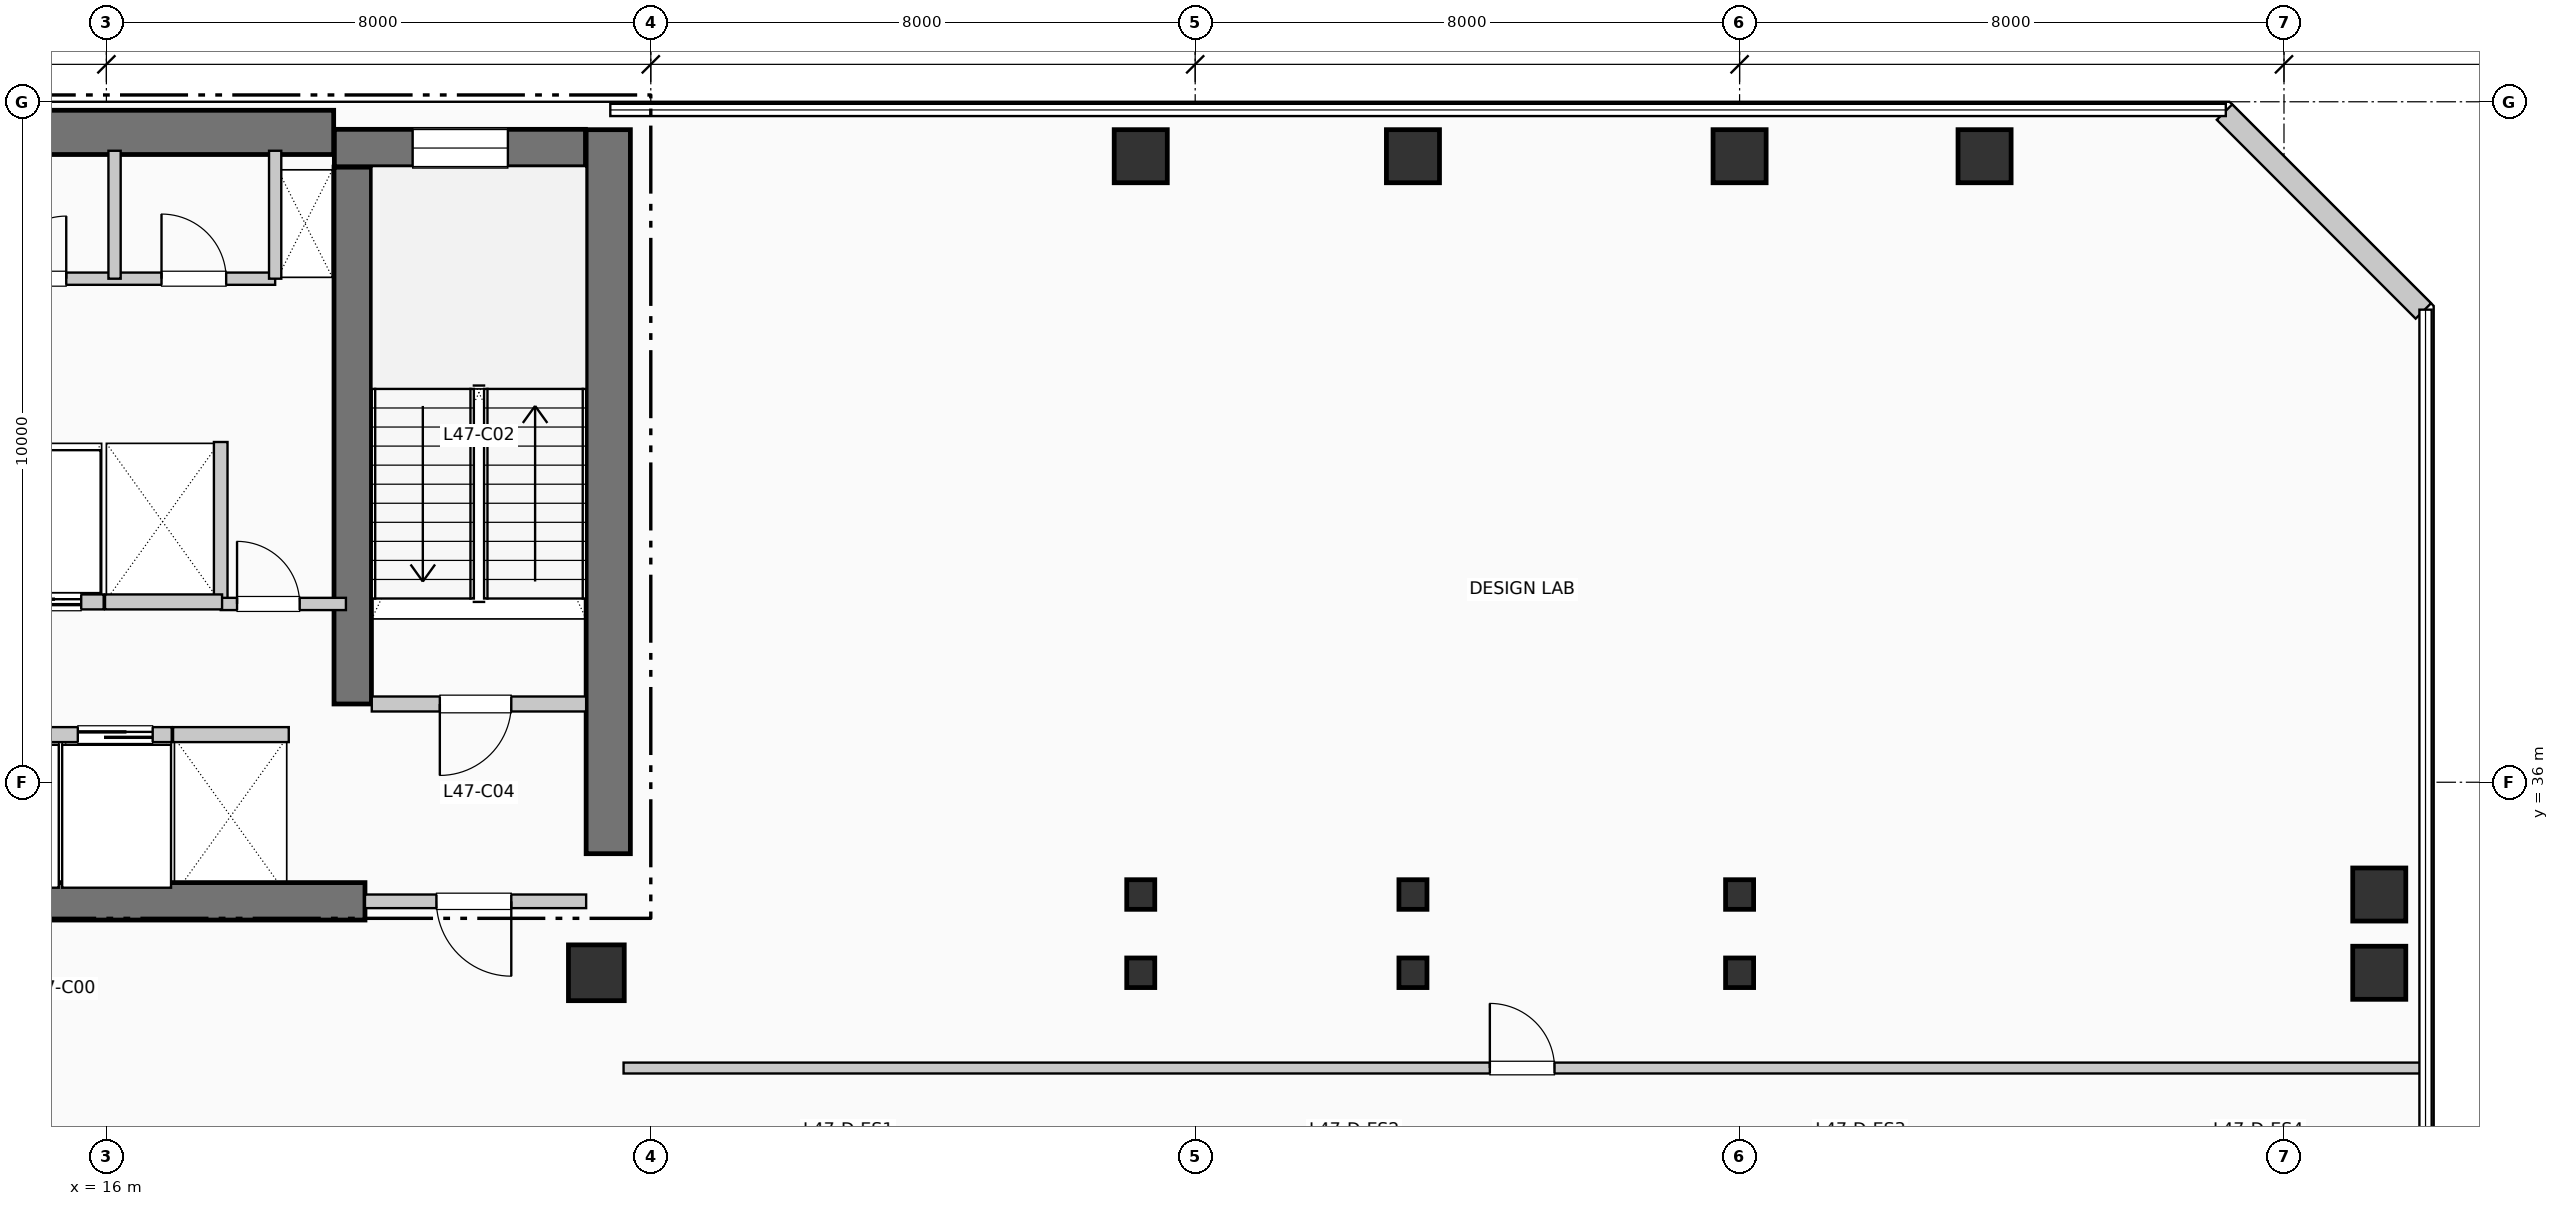
"""IFC4 building model, lengths in metres.
Left out: names, types, materials, properties, quantities, classifications, styles, units other than length and angle.
Written with IfcOpenShell. Run it as: python <this file> out.ifc"""

import sys

from ifc_helpers import new_model, si_unit, direction, frame, frame_2d, origin, origin_2d, place, context, subcontext, project, spatial, rectangle, i_section, extrude, element, fill, save


model = new_model("IFC4")
c1 = context("Model", 3, precision=1e-05, world=origin(), true_north=direction((0.0, 1.0)))
c2 = subcontext(c1, "Body", "Model", "MODEL_VIEW")
j1 = project(units=[si_unit("LENGTHUNIT", "METRE"), si_unit("PLANEANGLEUNIT", "RADIAN")], contexts=[c1])
p1 = place(None, origin())
s1 = spatial("IfcSite", under=j1, at=p1, CompositionType="ELEMENT")
p2 = place(p1, origin())
s2 = spatial("IfcBuilding", under=s1, at=p2, CompositionType="ELEMENT")
p3 = place(p2, frame((0.0, 0.0, 195.36)))
s3 = spatial("IfcBuildingStorey", under=s2, at=p3, CompositionType="ELEMENT", Elevation=195.36)
p4 = place(p3, frame((5.36, 45.55, 0.0), z_axis=(0.0, 0.0, 1.0), x_axis=(1.0, 0.0, 0.0)))
e1 = element("IfcWall", 1, at=p4, inside=s3, PredefinedType="SHEAR", context=c2, shape_type="SweptSolid", body=[
    extrude(rectangle(XDim=13.98, YDim=0.65, at=frame_2d((6.99, 0.0))), origin(), (0.0, 0.0, 1.0), 3.96),
])
p5 = place(p3, frame((23.375, 34.95, 0.0), z_axis=(0.0, 0.0, 1.0), x_axis=(0.0, 1.0, 0.0)))
e2 = element("IfcWall", 2, at=p5, inside=s3, PredefinedType="SHEAR", context=c2, shape_type="SweptSolid", body=[
    extrude(rectangle(XDim=10.64, YDim=0.65, at=frame_2d((5.32, 0.0))), origin(), (0.0, 0.0, 1.0), 3.96),
])
p6 = place(p3, frame((13.68, 34.25, 0.0), z_axis=(0.0, 0.0, 1.0), x_axis=(1.0, 0.0, 0.0)))
e3 = element("IfcWall", 3, at=p6, inside=s3, PredefinedType="SHEAR", context=c2, shape_type="SweptSolid", body=[
    extrude(rectangle(XDim=6.12, YDim=0.55, at=frame_2d((3.06, 0.0))), origin(), (0.0, 0.0, 1.0), 3.96),
])
p7 = place(p3, frame((19.62, 37.15, 0.0), z_axis=(0.0, 0.0, 1.0), x_axis=(0.0, 1.0, 0.0)))
e4 = element("IfcWall", 4, at=p7, inside=s3, PredefinedType="SHEAR", context=c2, shape_type="SweptSolid", body=[
    extrude(rectangle(XDim=7.89, YDim=0.55, at=frame_2d((3.945, 0.0))), origin(), (0.0, 0.0, 1.0), 3.96),
])
p8 = place(p3, frame((19.35, 45.32, 0.0), z_axis=(0.0, 0.0, 1.0), x_axis=(1.0, 0.0, 0.0)))
e5 = element("IfcWall", 5, at=p8, inside=s3, PredefinedType="SHEAR", context=c2, shape_type="SweptSolid", body=[
    extrude(rectangle(XDim=3.69, YDim=0.55, at=frame_2d((1.845, 0.0))), origin(), (0.0, 0.0, 1.0), 3.96),
])
p9 = place(p8, frame((1.15, 0.0, 1.05)))
e6 = element("IfcOpeningElement", 6, at=p9, cuts=e5, PredefinedType="OPENING", context=c2, shape_type="SweptSolid", body=[
    extrude(rectangle(XDim=1.4, YDim=1.8, at=frame_2d((0.7, 0.9))), frame((0.0, 0.285, 0.0), z_axis=(0.0, -1.0, 0.0), x_axis=(1.0, 0.0, 0.0)), (0.0, 0.0, 1.0), 0.57),
])
p10 = place(p3, frame((23.2, 33.2, 0.0), z_axis=(0.0, 0.0, 1.0), x_axis=(1.0, 0.0, 0.0)))
e7 = element("IfcColumn", 7, at=p10, inside=s3, PredefinedType="COLUMN", context=c2, shape_type="SweptSolid", body=[
    extrude(rectangle(XDim=0.82, YDim=0.82, at=origin_2d()), origin(), (0.0, 0.0, 1.0), 3.96),
])
for number, where, z_axis, x_axis in (
    (8, (31.2, 33.2, 0.0), (0.0, 0.0, 1.0), (1.0, 0.0, 0.0)),
    (9, (31.2, 34.35, 0.0), (0.0, 0.0, 1.0), (1.0, 0.0, 0.0)),
):
    element("IfcColumn", number, at=place(p3, frame(where, z_axis=z_axis, x_axis=x_axis)), inside=s3, PredefinedType="COLUMN", context=c2, shape_type="SweptSolid", body=[
        extrude(i_section(OverallWidth=0.412, OverallDepth=0.435, WebThickness=0.027, FlangeThickness=0.043, at=origin_2d()), origin(), (0.0, 0.0, 1.0), 3.96),
    ])
p11 = place(p3, frame((31.2, 45.2, 0.0), z_axis=(0.0, 0.0, 1.0), x_axis=(1.0, 0.0, 0.0)))
e10 = element("IfcColumn", 10, at=p11, inside=s3, PredefinedType="COLUMN", context=c2, shape_type="SweptSolid", body=[
    extrude(rectangle(XDim=0.78, YDim=0.78, at=origin_2d()), origin(), (0.0, 0.0, 1.0), 3.96),
])
for number, where, z_axis, x_axis in (
    (11, (35.2, 33.2, 0.0), (0.0, 0.0, 1.0), (1.0, 0.0, 0.0)),
    (12, (35.2, 34.35, 0.0), (0.0, 0.0, 1.0), (1.0, 0.0, 0.0)),
):
    element("IfcColumn", number, at=place(p3, frame(where, z_axis=z_axis, x_axis=x_axis)), inside=s3, PredefinedType="COLUMN", context=c2, shape_type="SweptSolid", body=[
        extrude(i_section(OverallWidth=0.412, OverallDepth=0.435, WebThickness=0.027, FlangeThickness=0.043, at=origin_2d()), origin(), (0.0, 0.0, 1.0), 3.96),
    ])
p12 = place(p3, frame((35.2, 45.2, 0.0), z_axis=(0.0, 0.0, 1.0), x_axis=(1.0, 0.0, 0.0)))
e13 = element("IfcColumn", 13, at=p12, inside=s3, PredefinedType="COLUMN", context=c2, shape_type="SweptSolid", body=[
    extrude(rectangle(XDim=0.78, YDim=0.78, at=origin_2d()), origin(), (0.0, 0.0, 1.0), 3.96),
])
for number, where, z_axis, x_axis in (
    (14, (40.0, 33.2, 0.0), (0.0, 0.0, 1.0), (1.0, 0.0, 0.0)),
    (15, (40.0, 34.35, 0.0), (0.0, 0.0, 1.0), (1.0, 0.0, 0.0)),
):
    element("IfcColumn", number, at=place(p3, frame(where, z_axis=z_axis, x_axis=x_axis)), inside=s3, PredefinedType="COLUMN", context=c2, shape_type="SweptSolid", body=[
        extrude(i_section(OverallWidth=0.412, OverallDepth=0.435, WebThickness=0.027, FlangeThickness=0.043, at=origin_2d()), origin(), (0.0, 0.0, 1.0), 3.96),
    ])
for number, where, z_axis, x_axis in (
    (16, (40.0, 45.2, 0.0), (0.0, 0.0, 1.0), (1.0, 0.0, 0.0)),
    (17, (43.6, 45.2, 0.0), (0.0, 0.0, 1.0), (1.0, 0.0, 0.0)),
    (18, (49.4, 33.2, 0.0), (0.0, 0.0, 1.0), (1.0, 0.0, 0.0)),
    (19, (49.4, 34.35, 0.0), (0.0, 0.0, 1.0), (1.0, 0.0, 0.0)),
):
    element("IfcColumn", number, at=place(p3, frame(where, z_axis=z_axis, x_axis=x_axis)), inside=s3, PredefinedType="COLUMN", context=c2, shape_type="SweptSolid", body=[
        extrude(rectangle(XDim=0.78, YDim=0.78, at=origin_2d()), origin(), (0.0, 0.0, 1.0), 3.96),
    ])
p13 = place(p3, frame((50.048, 42.926, 0.0), z_axis=(0.0, 0.0, 1.0), x_axis=(-0.707136318428, 0.707077242712, 0.0)))
e20 = element("IfcWall", 20, at=p13, inside=s3, PredefinedType="SOLIDWALL", context=c2, shape_type="SweptSolid", body=[
    extrude(rectangle(XDim=4.133, YDim=0.32, at=frame_2d((2.066, 0.0))), origin(), (0.0, 0.0, 1.0), 3.71),
])
p14 = place(p3, frame((19.9, 37.15, 0.0), z_axis=(0.0, 0.0, 1.0), x_axis=(1.0, 0.0, 0.0)))
e21 = element("IfcWall", 21, at=p14, inside=s3, PredefinedType="PARTITIONING", context=c2, shape_type="SweptSolid", body=[
    extrude(rectangle(XDim=3.15, YDim=0.22, at=frame_2d((1.575, 0.0))), origin(), (0.0, 0.0, 1.0), 3.71),
])
p15 = place(p14, frame((2.05, 0.0, 0.0), z_axis=(0.0, 0.0, 1.0), x_axis=(-1.0, 0.0, 0.0)))
e22 = element("IfcOpeningElement", 22, at=p15, cuts=e21, PredefinedType="OPENING", context=c2, shape_type="SweptSolid", body=[
    extrude(rectangle(XDim=1.05, YDim=2.15, at=frame_2d((0.525, 1.075))), frame((0.0, 0.12, 0.0), z_axis=(0.0, -1.0, 0.0), x_axis=(1.0, 0.0, 0.0)), (0.0, 0.0, 1.0), 0.24),
])
p16 = place(p3, frame((19.8, 34.25, 0.0), z_axis=(0.0, 0.0, 1.0), x_axis=(1.0, 0.0, 0.0)))
e23 = element("IfcWall", 23, at=p16, inside=s3, PredefinedType="PARTITIONING", context=c2, shape_type="SweptSolid", body=[
    extrude(rectangle(XDim=3.25, YDim=0.2, at=frame_2d((1.625, 0.0))), origin(), (0.0, 0.0, 1.0), 3.71),
])
p17 = place(p16, frame((2.15, 0.0, 0.0), z_axis=(0.0, 0.0, 1.0), x_axis=(-1.0, 0.0, 0.0)))
e24 = element("IfcOpeningElement", 24, at=p17, cuts=e23, PredefinedType="OPENING", context=c2, shape_type="SweptSolid", body=[
    extrude(rectangle(XDim=1.1, YDim=2.15, at=frame_2d((0.55, 1.075))), frame((0.0, 0.11, 0.0), z_axis=(0.0, -1.0, 0.0), x_axis=(1.0, 0.0, 0.0)), (0.0, 0.0, 1.0), 0.22),
])
p18 = place(p3, frame((17.68, 38.65, 0.0), z_axis=(0.0, 0.0, 1.0), x_axis=(0.0, 1.0, 0.0)))
e25 = element("IfcWall", 25, at=p18, inside=s3, PredefinedType="PARTITIONING", context=c2, shape_type="SweptSolid", body=[
    extrude(rectangle(XDim=2.35, YDim=0.2, at=frame_2d((1.175, 0.0))), origin(), (0.0, 0.0, 1.0), 3.71),
])
p19 = place(p3, frame((17.68, 38.62, 0.0), z_axis=(0.0, 0.0, 1.0), x_axis=(1.0, 0.0, 0.0)))
e26 = element("IfcWall", 26, at=p19, inside=s3, PredefinedType="PARTITIONING", context=c2, shape_type="SweptSolid", body=[
    extrude(rectangle(XDim=1.84, YDim=0.18, at=frame_2d((0.92, 0.0))), origin(), (0.0, 0.0, 1.0), 3.71),
])
p20 = place(p19, frame((0.24, 0.0, 0.0)))
e27 = element("IfcOpeningElement", 27, at=p20, cuts=e26, PredefinedType="OPENING", context=c2, shape_type="SweptSolid", body=[
    extrude(rectangle(XDim=0.92, YDim=2.1, at=frame_2d((0.46, 1.05))), frame((0.0, 0.1, 0.0), z_axis=(0.0, -1.0, 0.0), x_axis=(1.0, 0.0, 0.0)), (0.0, 0.0, 1.0), 0.2),
])
p21 = place(p3, frame((13.68, 36.7, 0.0), z_axis=(0.0, 0.0, 1.0), x_axis=(1.0, 0.0, 0.0)))
e28 = element("IfcWall", 28, at=p21, inside=s3, PredefinedType="PARTITIONING", context=c2, shape_type="SweptSolid", body=[
    extrude(rectangle(XDim=3.28, YDim=0.22, at=frame_2d((1.64, 0.0))), origin(), (0.0, 0.0, 1.0), 3.71),
])
p22 = place(p21, frame((0.28, 0.0, 0.0)))
e29 = element("IfcOpeningElement", 29, at=p22, cuts=e28, PredefinedType="OPENING", context=c2, shape_type="SweptSolid", body=[
    extrude(rectangle(XDim=1.1, YDim=2.2, at=frame_2d((0.55, 1.1))), frame((0.0, 0.12, 0.0), z_axis=(0.0, -1.0, 0.0), x_axis=(1.0, 0.0, 0.0)), (0.0, 0.0, 1.0), 0.24),
])
p23 = place(p21, frame((1.9, 0.0, 0.0)))
e30 = element("IfcOpeningElement", 30, at=p23, cuts=e28, PredefinedType="OPENING", context=c2, shape_type="SweptSolid", body=[
    extrude(rectangle(XDim=1.1, YDim=2.2, at=frame_2d((0.55, 1.1))), frame((0.0, 0.12, 0.0), z_axis=(0.0, -1.0, 0.0), x_axis=(1.0, 0.0, 0.0)), (0.0, 0.0, 1.0), 0.24),
])
p24 = place(p3, frame((12.58, 38.65, 0.0), z_axis=(0.0, 0.0, 1.0), x_axis=(1.0, 0.0, 0.0)))
e31 = element("IfcWall", 31, at=p24, inside=s3, PredefinedType="PARTITIONING", context=c2, shape_type="SweptSolid", body=[
    extrude(rectangle(XDim=3.38, YDim=0.22, at=frame_2d((1.69, 0.0))), origin(), (0.0, 0.0, 1.0), 3.71),
])
p25 = place(p24, frame((0.3, 0.0, 0.0)))
e32 = element("IfcOpeningElement", 32, at=p25, cuts=e31, PredefinedType="OPENING", context=c2, shape_type="SweptSolid", body=[
    extrude(rectangle(XDim=1.1, YDim=2.2, at=frame_2d((0.55, 1.1))), frame((0.0, 0.12, 0.0), z_axis=(0.0, -1.0, 0.0), x_axis=(1.0, 0.0, 0.0)), (0.0, 0.0, 1.0), 0.24),
])
p26 = place(p24, frame((1.95, 0.0, 0.0)))
e33 = element("IfcOpeningElement", 33, at=p26, cuts=e31, PredefinedType="OPENING", context=c2, shape_type="SweptSolid", body=[
    extrude(rectangle(XDim=1.1, YDim=2.2, at=frame_2d((0.55, 1.1))), frame((0.0, 0.12, 0.0), z_axis=(0.0, -1.0, 0.0), x_axis=(1.0, 0.0, 0.0)), (0.0, 0.0, 1.0), 0.24),
])
p27 = place(p3, frame((16.98, 36.7, 0.0), z_axis=(0.0, 0.0, 1.0), x_axis=(1.0, 0.0, 0.0)))
e34 = element("IfcWall", 34, at=p27, inside=s3, PredefinedType="PARTITIONING", context=c2, shape_type="SweptSolid", body=[
    extrude(rectangle(XDim=1.7, YDim=0.22, at=frame_2d((0.85, 0.0))), origin(), (0.0, 0.0, 1.0), 3.71),
])
p28 = place(p3, frame((15.98, 38.65, 0.0), z_axis=(0.0, 0.0, 1.0), x_axis=(1.0, 0.0, 0.0)))
e35 = element("IfcWall", 35, at=p28, inside=s3, PredefinedType="PARTITIONING", context=c2, shape_type="SweptSolid", body=[
    extrude(rectangle(XDim=1.72, YDim=0.22, at=frame_2d((0.86, 0.0))), origin(), (0.0, 0.0, 1.0), 3.71),
])
p29 = place(p3, frame((9.15, 43.4, 0.0), z_axis=(0.0, 0.0, 1.0), x_axis=(1.0, 0.0, 0.0)))
e36 = element("IfcWall", 36, at=p29, inside=s3, PredefinedType="PLUMBINGWALL", context=c2, shape_type="SweptSolid", body=[
    extrude(rectangle(XDim=9.33, YDim=0.18, at=frame_2d((4.665, 0.0))), origin(), (0.0, 0.0, 1.0), 3.71),
])
p30 = place(p29, frame((0.72, 0.0, 0.0)))
e37 = element("IfcOpeningElement", 37, at=p30, cuts=e36, PredefinedType="OPENING", context=c2, shape_type="SweptSolid", body=[
    extrude(rectangle(XDim=0.92, YDim=2.1, at=frame_2d((0.46, 1.05))), frame((0.0, 0.1, 0.0), z_axis=(0.0, -1.0, 0.0), x_axis=(1.0, 0.0, 0.0)), (0.0, 0.0, 1.0), 0.2),
])
p31 = place(p29, frame((3.02, 0.0, 0.0)))
e38 = element("IfcOpeningElement", 38, at=p31, cuts=e36, PredefinedType="OPENING", context=c2, shape_type="SweptSolid", body=[
    extrude(rectangle(XDim=0.92, YDim=2.1, at=frame_2d((0.46, 1.05))), frame((0.0, 0.1, 0.0), z_axis=(0.0, -1.0, 0.0), x_axis=(1.0, 0.0, 0.0)), (0.0, 0.0, 1.0), 0.2),
])
p32 = place(p29, frame((5.34, 0.0, 0.0)))
e39 = element("IfcOpeningElement", 39, at=p32, cuts=e36, PredefinedType="OPENING", context=c2, shape_type="SweptSolid", body=[
    extrude(rectangle(XDim=0.92, YDim=2.1, at=frame_2d((0.46, 1.05))), frame((0.0, 0.1, 0.0), z_axis=(0.0, -1.0, 0.0), x_axis=(1.0, 0.0, 0.0)), (0.0, 0.0, 1.0), 0.2),
])
p33 = place(p29, frame((7.66, 0.0, 0.0)))
e40 = element("IfcOpeningElement", 40, at=p33, cuts=e36, PredefinedType="OPENING", context=c2, shape_type="SweptSolid", body=[
    extrude(rectangle(XDim=0.95, YDim=2.1, at=frame_2d((0.475, 1.05))), frame((0.0, 0.1, 0.0), z_axis=(0.0, -1.0, 0.0), x_axis=(1.0, 0.0, 0.0)), (0.0, 0.0, 1.0), 0.2),
])
for number, where, z_axis, x_axis in (
    (41, (18.48, 43.4, 0.0), (0.0, 0.0, 1.0), (0.0, 1.0, 0.0)),
    (42, (16.12, 43.4, 0.0), (0.0, 0.0, 1.0), (0.0, 1.0, 0.0)),
):
    element("IfcWall", number, at=place(p3, frame(where, z_axis=z_axis, x_axis=x_axis)), inside=s3, PredefinedType="PLUMBINGWALL", context=c2, shape_type="SweptSolid", body=[
        extrude(rectangle(XDim=1.88, YDim=0.18, at=frame_2d((0.94, 0.0))), origin(), (0.0, 0.0, 1.0), 3.71),
    ])
p34 = place(p3, frame((23.6, 31.8, 0.0), z_axis=(0.0, 0.0, 1.0), x_axis=(1.0, 0.0, 0.0)))
e43 = element("IfcWall", 43, at=p34, inside=s3, PredefinedType="PARTITIONING", context=c2, shape_type="SweptSolid", body=[
    extrude(rectangle(XDim=26.41, YDim=0.16, at=frame_2d((13.205, 0.0))), origin(), (0.0, 0.0, 1.0), 3.71),
])
p35 = place(p34, frame((12.73, 0.0, 0.0)))
e44 = element("IfcOpeningElement", 44, at=p35, cuts=e43, PredefinedType="OPENING", context=c2, shape_type="SweptSolid", body=[
    extrude(rectangle(XDim=0.95, YDim=2.15, at=frame_2d((0.475, 1.075))), frame((0.0, 0.09, 0.0), z_axis=(0.0, -1.0, 0.0), x_axis=(1.0, 0.0, 0.0)), (0.0, 0.0, 1.0), 0.18),
])
p36 = place(p9, origin())
e45 = element("IfcWindow", 45, at=p36, inside=s3, PartitioningType="SINGLE_PANEL", PredefinedType="WINDOW", context=c2, shape_type="SweptSolid", body=[
    extrude(rectangle(XDim=1.4, YDim=1.8, at=frame_2d((0.7, 0.9))), frame((0.0, 0.03, 0.0), z_axis=(0.0, -1.0, 0.0), x_axis=(1.0, 0.0, 0.0)), (0.0, 0.0, 1.0), 0.06),
])
fill(e6, e45)
p37 = place(p15, origin())
e46 = element("IfcDoor", 46, at=p37, inside=s3, OperationType="SINGLE_SWING_LEFT", PredefinedType="DOOR", context=c2, shape_type="SweptSolid", body=[
    extrude(rectangle(XDim=1.05, YDim=2.15, at=frame_2d((0.525, 1.075))), frame((0.0, 0.025, 0.0), z_axis=(0.0, -1.0, 0.0), x_axis=(1.0, 0.0, 0.0)), (0.0, 0.0, 1.0), 0.05),
])
fill(e22, e46)
p38 = place(p17, origin())
e47 = element("IfcDoor", 47, at=p38, inside=s3, OperationType="SINGLE_SWING_RIGHT", PredefinedType="DOOR", context=c2, shape_type="SweptSolid", body=[
    extrude(rectangle(XDim=1.1, YDim=2.15, at=frame_2d((0.55, 1.075))), frame((0.0, 0.025, 0.0), z_axis=(0.0, -1.0, 0.0), x_axis=(1.0, 0.0, 0.0)), (0.0, 0.0, 1.0), 0.05),
])
fill(e24, e47)
p39 = place(p20, origin())
e48 = element("IfcDoor", 48, at=p39, inside=s3, OperationType="SINGLE_SWING_LEFT", PredefinedType="DOOR", context=c2, shape_type="SweptSolid", body=[
    extrude(rectangle(XDim=0.92, YDim=2.1, at=frame_2d((0.46, 1.05))), frame((0.0, 0.025, 0.0), z_axis=(0.0, -1.0, 0.0), x_axis=(1.0, 0.0, 0.0)), (0.0, 0.0, 1.0), 0.05),
])
fill(e27, e48)
p40 = place(p23, origin())
e49 = element("IfcDoor", 49, at=p40, inside=s3, OperationType="SLIDING_TO_RIGHT", PredefinedType="DOOR", context=c2, shape_type="SweptSolid", body=[
    extrude(rectangle(XDim=1.1, YDim=2.2, at=frame_2d((0.55, 1.1))), frame((0.0, 0.025, 0.0), z_axis=(0.0, -1.0, 0.0), x_axis=(1.0, 0.0, 0.0)), (0.0, 0.0, 1.0), 0.05),
])
fill(e30, e49)
p41 = place(p26, origin())
e50 = element("IfcDoor", 50, at=p41, inside=s3, OperationType="SLIDING_TO_RIGHT", PredefinedType="DOOR", context=c2, shape_type="SweptSolid", body=[
    extrude(rectangle(XDim=1.1, YDim=2.2, at=frame_2d((0.55, 1.1))), frame((0.0, 0.025, 0.0), z_axis=(0.0, -1.0, 0.0), x_axis=(1.0, 0.0, 0.0)), (0.0, 0.0, 1.0), 0.05),
])
fill(e33, e50)
p42 = place(p32, origin())
e51 = element("IfcDoor", 51, at=p42, inside=s3, OperationType="SINGLE_SWING_RIGHT", PredefinedType="DOOR", context=c2, shape_type="SweptSolid", body=[
    extrude(rectangle(XDim=0.92, YDim=2.1, at=frame_2d((0.46, 1.05))), frame((0.0, 0.025, 0.0), z_axis=(0.0, -1.0, 0.0), x_axis=(1.0, 0.0, 0.0)), (0.0, 0.0, 1.0), 0.05),
])
fill(e39, e51)
p43 = place(p33, origin())
e52 = element("IfcDoor", 52, at=p43, inside=s3, OperationType="SINGLE_SWING_LEFT", PredefinedType="DOOR", context=c2, shape_type="SweptSolid", body=[
    extrude(rectangle(XDim=0.95, YDim=2.1, at=frame_2d((0.475, 1.05))), frame((0.0, 0.025, 0.0), z_axis=(0.0, -1.0, 0.0), x_axis=(1.0, 0.0, 0.0)), (0.0, 0.0, 1.0), 0.05),
])
fill(e40, e52)
p44 = place(p35, origin())
e53 = element("IfcDoor", 53, at=p44, inside=s3, OperationType="SINGLE_SWING_LEFT", PredefinedType="DOOR", context=c2, shape_type="SweptSolid", body=[
    extrude(rectangle(XDim=0.95, YDim=2.15, at=frame_2d((0.475, 1.075))), frame((0.0, 0.025, 0.0), z_axis=(0.0, -1.0, 0.0), x_axis=(1.0, 0.0, 0.0)), (0.0, 0.0, 1.0), 0.05),
])
fill(e44, e53)
save(model, sys.argv[1])
